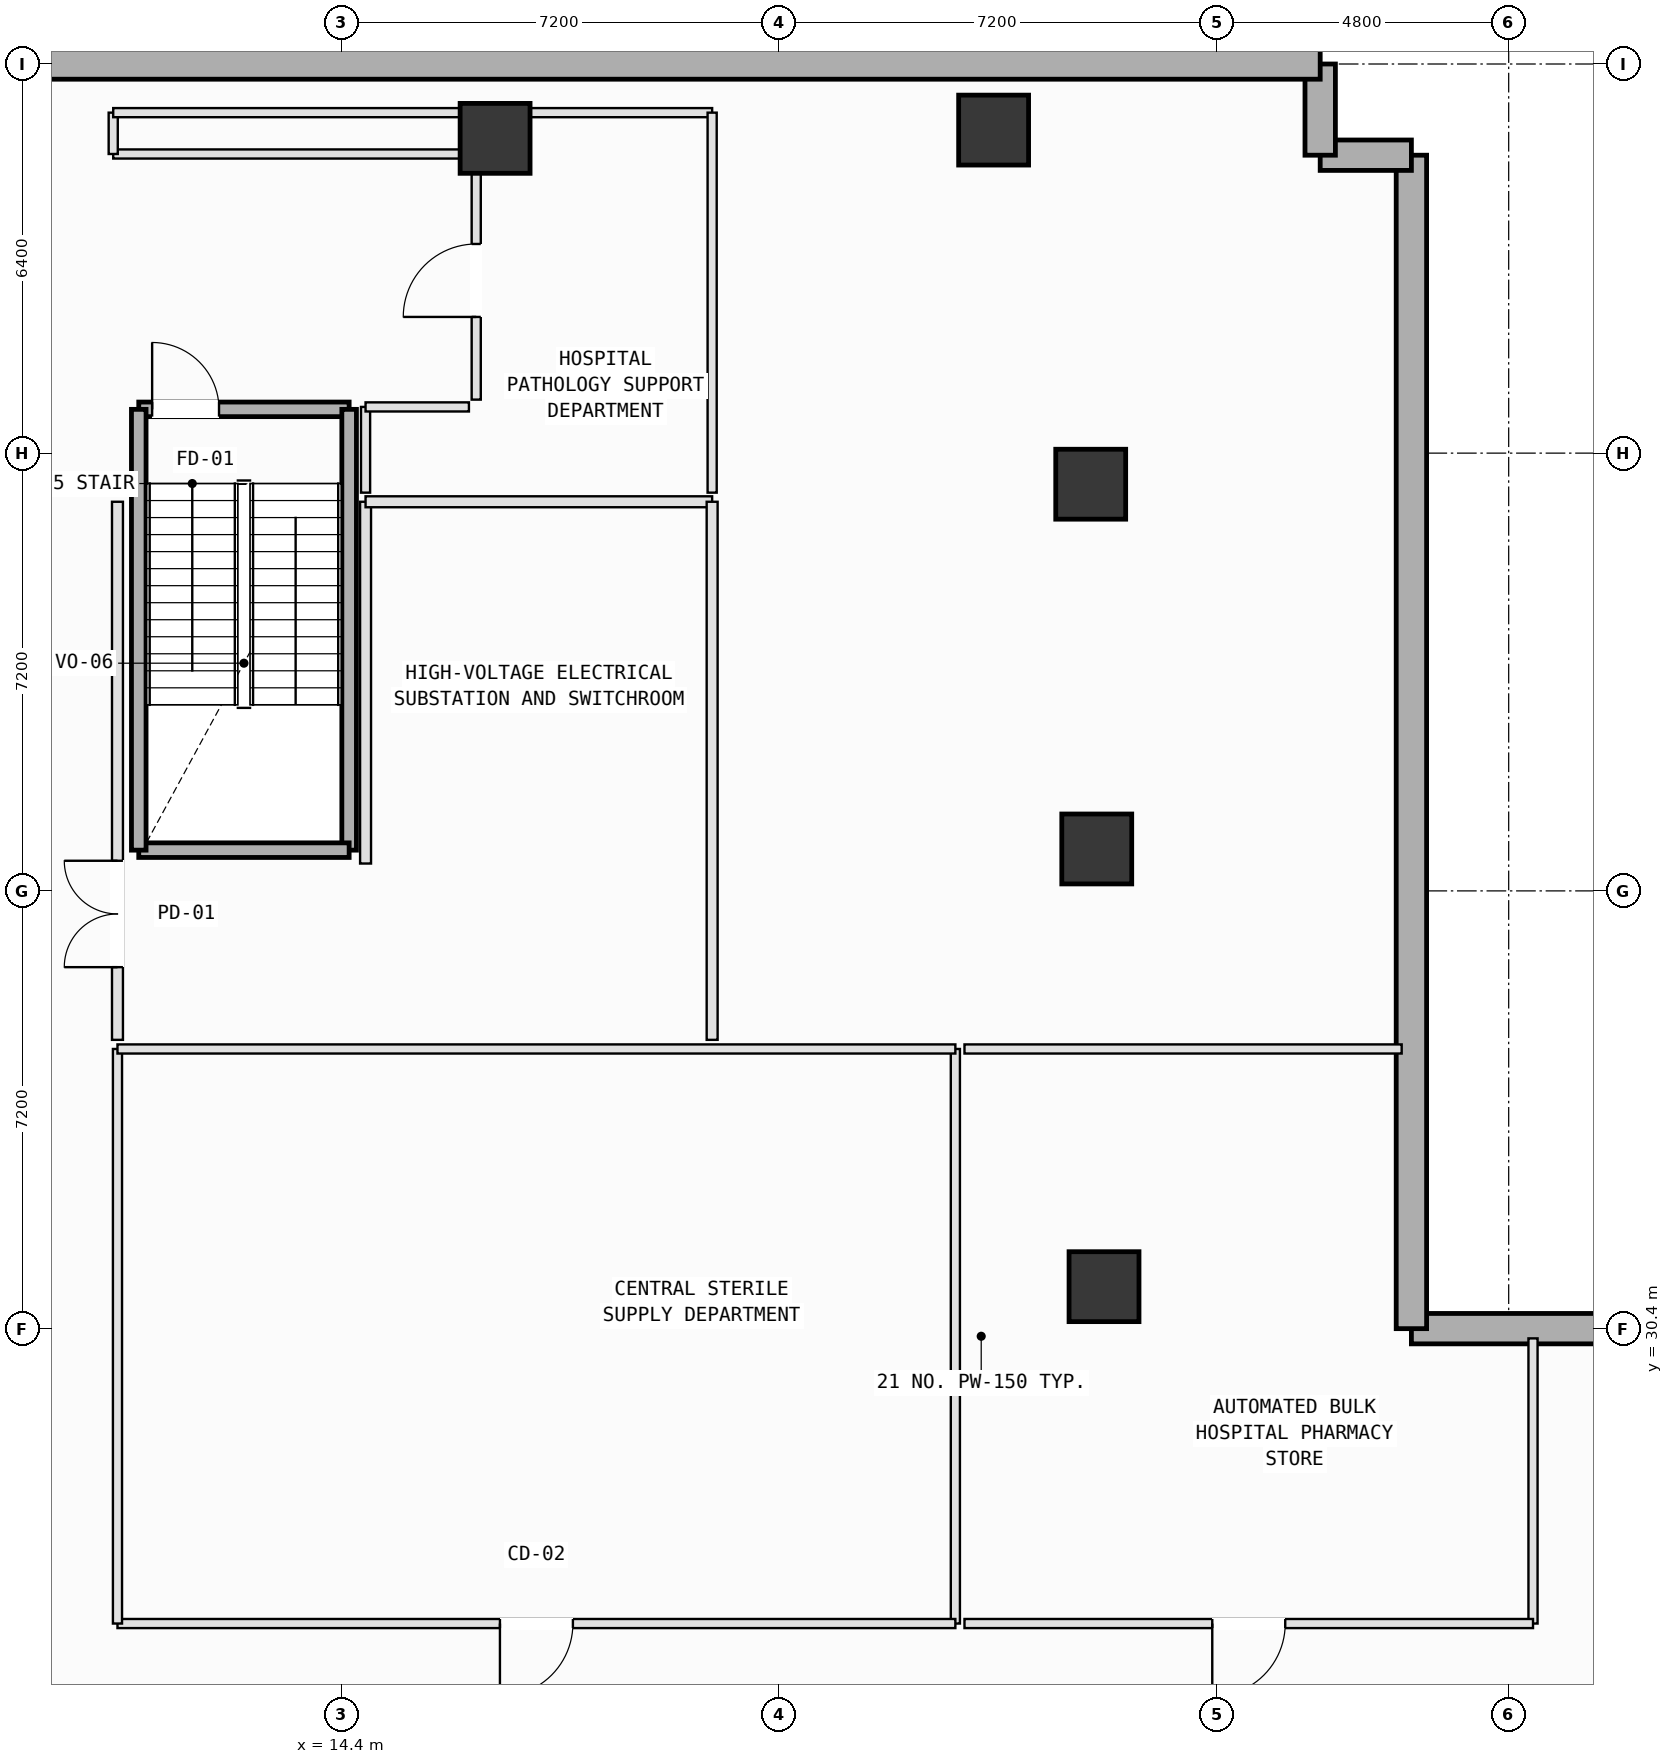
"""IFC4 building model, lengths in metres.
Left out: names, types, materials, properties, quantities, classifications, styles, units other than length and angle.
Written with IfcOpenShell. Run it as: python <this file> out.ifc"""

import sys

from ifc_helpers import new_model, si_unit, direction, frame, frame_2d, origin, origin_2d, place, context, subcontext, project, spatial, rectangle, extrude, element, fill, save


model = new_model("IFC4")
c1 = context("Model", 3, precision=1e-05, world=origin(), true_north=direction((0.0, 1.0)))
c2 = subcontext(c1, "Body", "Model", "MODEL_VIEW")
j1 = project(units=[si_unit("LENGTHUNIT", "METRE"), si_unit("PLANEANGLEUNIT", "RADIAN")], contexts=[c1])
p1 = place(None, origin())
s1 = spatial("IfcSite", under=j1, at=p1, CompositionType="ELEMENT")
p2 = place(p1, origin())
s2 = spatial("IfcBuilding", under=s1, at=p2, CompositionType="ELEMENT")
p3 = place(p2, frame((0.0, 0.0, -4.8)))
s3 = spatial("IfcBuildingStorey", under=s2, at=p3, CompositionType="ELEMENT", Elevation=-4.8)
for number, where, z_axis, x_axis in (
    (1, (26.945, 31.091, 0.0), (0.0, 0.0, 1.0), (1.0, 0.0, 0.0)),
    (2, (26.825, 38.29, 0.0), (0.0, 0.0, 1.0), (1.0, 0.0, 0.0)),
    (3, (26.726, 44.289, 0.0), (0.0, 0.0, 1.0), (1.0, 0.0, 0.0)),
    (4, (25.129, 50.113, 0.0), (0.0, 0.0, 1.0), (1.0, 0.0, 0.0)),
    (5, (16.93, 49.977, 0.0), (0.0, 0.0, 1.0), (1.0, 0.0, 0.0)),
):
    element("IfcColumn", number, at=place(p3, frame(where, z_axis=z_axis, x_axis=x_axis)), inside=s3, PredefinedType="COLUMN", context=c2, shape_type="SweptSolid", body=[
        extrude(rectangle(XDim=1.15, YDim=1.15, at=origin_2d()), origin(), (0.0, 0.0, 1.0), 4.8),
    ])
p4 = place(p3, frame((32.0, 30.4, 0.0), z_axis=(0.0, 0.0, 1.0), x_axis=(1.0, 0.0, 0.0)))
e6 = element("IfcWall", 6, at=p4, inside=s3, PredefinedType="USERDEFINED", context=c2, shape_type="SweptSolid", body=[
    extrude(rectangle(XDim=49.3, YDim=0.5, at=frame_2d((24.65, 0.0))), origin(), (0.0, 0.0, 1.0), 4.55),
])
p5 = place(p3, frame((32.0, 30.4, 0.0), z_axis=(0.0, 0.0, 1.0), x_axis=(0.0, 1.0, 0.0)))
e7 = element("IfcWall", 7, at=p5, inside=s3, PredefinedType="USERDEFINED", context=c2, shape_type="SweptSolid", body=[
    extrude(rectangle(XDim=19.3, YDim=0.5, at=frame_2d((9.65, 0.0))), origin(), (0.0, 0.0, 1.0), 4.55),
])
for number, where, z_axis, x_axis in (
    (8, (30.5, 49.7, 0.0), (0.0, 0.0, 1.0), (1.0, 0.0, 0.0)),
    (9, (30.5, 49.7, 0.0), (0.0, 0.0, 1.0), (0.0, 1.0, 0.0)),
):
    element("IfcWall", number, at=place(p3, frame(where, z_axis=z_axis, x_axis=x_axis)), inside=s3, PredefinedType="USERDEFINED", context=c2, shape_type="SweptSolid", body=[
        extrude(rectangle(XDim=1.5, YDim=0.5, at=frame_2d((0.75, 0.0))), origin(), (0.0, 0.0, 1.0), 4.55),
    ])
p6 = place(p3, frame((3.0, 51.2, 0.0), z_axis=(0.0, 0.0, 1.0), x_axis=(1.0, 0.0, 0.0)))
e10 = element("IfcWall", 10, at=p6, inside=s3, PredefinedType="USERDEFINED", context=c2, shape_type="SweptSolid", body=[
    extrude(rectangle(XDim=27.5, YDim=0.5, at=frame_2d((13.75, 0.0))), origin(), (0.0, 0.0, 1.0), 4.55),
])
p7 = place(p3, frame((11.07, 45.52, 0.0), z_axis=(0.0, 0.0, 1.0), x_axis=(1.0, 0.0, 0.0)))
e11 = element("IfcWall", 11, at=p7, inside=s3, PredefinedType="SOLIDWALL", context=c2, shape_type="SweptSolid", body=[
    extrude(rectangle(XDim=3.46, YDim=0.24, at=frame_2d((1.73, 0.0))), origin(), (0.0, 0.0, 1.0), 4.55),
])
p8 = place(p7, frame((0.22, 0.0, 0.0)))
e12 = element("IfcOpeningElement", 12, at=p8, cuts=e11, PredefinedType="OPENING", context=c2, shape_type="SweptSolid", body=[
    extrude(rectangle(XDim=1.1, YDim=2.15, at=frame_2d((0.55, 1.075))), frame((0.0, 0.13, 0.0), z_axis=(0.0, -1.0, 0.0), x_axis=(1.0, 0.0, 0.0)), (0.0, 0.0, 1.0), 0.26),
])
p9 = place(p3, frame((14.53, 45.52, 0.0), z_axis=(0.0, 0.0, 1.0), x_axis=(0.0, -1.0, 0.0)))
e13 = element("IfcWall", 13, at=p9, inside=s3, PredefinedType="SOLIDWALL", context=c2, shape_type="SweptSolid", body=[
    extrude(rectangle(XDim=7.25, YDim=0.24, at=frame_2d((3.625, 0.0))), origin(), (0.0, 0.0, 1.0), 4.55),
])
p10 = place(p3, frame((14.53, 38.27, 0.0), z_axis=(0.0, 0.0, 1.0), x_axis=(-1.0, 0.0, 0.0)))
e14 = element("IfcWall", 14, at=p10, inside=s3, PredefinedType="SOLIDWALL", context=c2, shape_type="SweptSolid", body=[
    extrude(rectangle(XDim=3.46, YDim=0.24, at=frame_2d((1.73, 0.0))), origin(), (0.0, 0.0, 1.0), 4.55),
])
p11 = place(p3, frame((11.07, 38.27, 0.0), z_axis=(0.0, 0.0, 1.0), x_axis=(0.0, 1.0, 0.0)))
e15 = element("IfcWall", 15, at=p11, inside=s3, PredefinedType="SOLIDWALL", context=c2, shape_type="SweptSolid", body=[
    extrude(rectangle(XDim=7.25, YDim=0.24, at=frame_2d((3.625, 0.0))), origin(), (0.0, 0.0, 1.0), 4.55),
])
p12 = place(p3, frame((24.5, 35.0, 0.0), z_axis=(0.0, 0.0, 1.0), x_axis=(0.0, -1.0, 0.0)))
e16 = element("IfcWall", 16, at=p12, inside=s3, PredefinedType="PARTITIONING", context=c2, shape_type="SweptSolid", body=[
    extrude(rectangle(XDim=9.45, YDim=0.15, at=frame_2d((4.725, 0.0))), origin(), (0.0, 0.0, 1.0), 4.55),
])
p13 = place(p3, frame((24.5, 25.55, 0.0), z_axis=(0.0, 0.0, 1.0), x_axis=(-1.0, 0.0, 0.0)))
e17 = element("IfcWall", 17, at=p13, inside=s3, PredefinedType="PARTITIONING", context=c2, shape_type="SweptSolid", body=[
    extrude(rectangle(XDim=13.78, YDim=0.15, at=frame_2d((6.89, 0.0))), origin(), (0.0, 0.0, 1.0), 4.55),
])
p14 = place(p13, frame((6.29, 0.0, 0.0)))
e18 = element("IfcOpeningElement", 18, at=p14, cuts=e17, PredefinedType="OPENING", context=c2, shape_type="SweptSolid", body=[
    extrude(rectangle(XDim=1.2, YDim=2.15, at=frame_2d((0.6, 1.075))), frame((0.0, 0.085, 0.0), z_axis=(0.0, -1.0, 0.0), x_axis=(1.0, 0.0, 0.0)), (0.0, 0.0, 1.0), 0.17),
])
p15 = place(p3, frame((10.72, 25.55, 0.0), z_axis=(0.0, 0.0, 1.0), x_axis=(0.0, 1.0, 0.0)))
e19 = element("IfcWall", 19, at=p15, inside=s3, PredefinedType="PARTITIONING", context=c2, shape_type="SweptSolid", body=[
    extrude(rectangle(XDim=9.45, YDim=0.15, at=frame_2d((4.725, 0.0))), origin(), (0.0, 0.0, 1.0), 4.55),
])
p16 = place(p3, frame((10.72, 35.0, 0.0), z_axis=(0.0, 0.0, 1.0), x_axis=(1.0, 0.0, 0.0)))
e20 = element("IfcWall", 20, at=p16, inside=s3, PredefinedType="PARTITIONING", context=c2, shape_type="SweptSolid", body=[
    extrude(rectangle(XDim=13.78, YDim=0.15, at=frame_2d((6.89, 0.0))), origin(), (0.0, 0.0, 1.0), 4.55),
])
p17 = place(p3, frame((34.0, 30.24, 0.0), z_axis=(0.0, 0.0, 1.0), x_axis=(0.0, -1.0, 0.0)))
e21 = element("IfcWall", 21, at=p17, inside=s3, PredefinedType="PARTITIONING", context=c2, shape_type="SweptSolid", body=[
    extrude(rectangle(XDim=4.69, YDim=0.15, at=frame_2d((2.345, 0.0))), origin(), (0.0, 0.0, 1.0), 4.55),
])
p18 = place(p3, frame((34.0, 25.55, 0.0), z_axis=(0.0, 0.0, 1.0), x_axis=(-1.0, 0.0, 0.0)))
e22 = element("IfcWall", 22, at=p18, inside=s3, PredefinedType="PARTITIONING", context=c2, shape_type="SweptSolid", body=[
    extrude(rectangle(XDim=9.35, YDim=0.15, at=frame_2d((4.675, 0.0))), origin(), (0.0, 0.0, 1.0), 4.55),
])
p19 = place(p18, frame((4.075, 0.0, 0.0)))
e23 = element("IfcOpeningElement", 23, at=p19, cuts=e22, PredefinedType="OPENING", context=c2, shape_type="SweptSolid", body=[
    extrude(rectangle(XDim=1.2, YDim=2.15, at=frame_2d((0.6, 1.075))), frame((0.0, 0.085, 0.0), z_axis=(0.0, -1.0, 0.0), x_axis=(1.0, 0.0, 0.0)), (0.0, 0.0, 1.0), 0.17),
])
p20 = place(p3, frame((24.65, 35.0, 0.0), z_axis=(0.0, 0.0, 1.0), x_axis=(1.0, 0.0, 0.0)))
e24 = element("IfcWall", 24, at=p20, inside=s3, PredefinedType="PARTITIONING", context=c2, shape_type="SweptSolid", body=[
    extrude(rectangle(XDim=7.19, YDim=0.15, at=frame_2d((3.595, 0.0))), origin(), (0.0, 0.0, 1.0), 4.55),
])
p21 = place(p3, frame((14.8, 38.05, 0.0), z_axis=(0.0, 0.0, 1.0), x_axis=(0.0, 1.0, 0.0)))
e25 = element("IfcWall", 25, at=p21, inside=s3, PredefinedType="PARTITIONING", context=c2, shape_type="SweptSolid", body=[
    extrude(rectangle(XDim=5.95, YDim=0.18, at=frame_2d((2.975, 0.0))), origin(), (0.0, 0.0, 1.0), 4.55),
])
p22 = place(p3, frame((14.8, 44.0, 0.0), z_axis=(0.0, 0.0, 1.0), x_axis=(1.0, 0.0, 0.0)))
e26 = element("IfcWall", 26, at=p22, inside=s3, PredefinedType="PARTITIONING", context=c2, shape_type="SweptSolid", body=[
    extrude(rectangle(XDim=5.7, YDim=0.18, at=frame_2d((2.85, 0.0))), origin(), (0.0, 0.0, 1.0), 4.55),
])
p23 = place(p3, frame((20.5, 44.0, 0.0), z_axis=(0.0, 0.0, 1.0), x_axis=(0.0, -1.0, 0.0)))
e27 = element("IfcWall", 27, at=p23, inside=s3, PredefinedType="PARTITIONING", context=c2, shape_type="SweptSolid", body=[
    extrude(rectangle(XDim=8.85, YDim=0.18, at=frame_2d((4.425, 0.0))), origin(), (0.0, 0.0, 1.0), 4.55),
])
p24 = place(p3, frame((10.72, 35.15, 0.0), z_axis=(0.0, 0.0, 1.0), x_axis=(0.0, 1.0, 0.0)))
e28 = element("IfcWall", 28, at=p24, inside=s3, PredefinedType="PARTITIONING", context=c2, shape_type="SweptSolid", body=[
    extrude(rectangle(XDim=8.85, YDim=0.18, at=frame_2d((4.425, 0.0))), origin(), (0.0, 0.0, 1.0), 4.55),
])
p25 = place(p24, frame((1.196, 0.0, 0.0)))
e29 = element("IfcOpeningElement", 29, at=p25, cuts=e28, PredefinedType="OPENING", context=c2, shape_type="SweptSolid", body=[
    extrude(rectangle(XDim=1.75, YDim=2.2, at=frame_2d((0.875, 1.1))), frame((0.0, 0.1, 0.0), z_axis=(0.0, -1.0, 0.0), x_axis=(1.0, 0.0, 0.0)), (0.0, 0.0, 1.0), 0.2),
])
p26 = place(p3, frame((16.62, 45.68, 0.0), z_axis=(0.0, 0.0, 1.0), x_axis=(0.0, 1.0, 0.0)))
e30 = element("IfcWall", 30, at=p26, inside=s3, PredefinedType="PARTITIONING", context=c2, shape_type="SweptSolid", body=[
    extrude(rectangle(XDim=3.92, YDim=0.15, at=frame_2d((1.96, 0.0))), origin(), (0.0, 0.0, 1.0), 4.55),
])
p27 = place(p26, frame((1.36, 0.0, 0.0)))
e31 = element("IfcOpeningElement", 31, at=p27, cuts=e30, PredefinedType="OPENING", context=c2, shape_type="SweptSolid", body=[
    extrude(rectangle(XDim=1.2, YDim=2.15, at=frame_2d((0.6, 1.075))), frame((0.0, 0.085, 0.0), z_axis=(0.0, -1.0, 0.0), x_axis=(1.0, 0.0, 0.0)), (0.0, 0.0, 1.0), 0.17),
])
p28 = place(p3, frame((16.5, 49.72, 0.0), z_axis=(0.0, 0.0, 1.0), x_axis=(-1.0, 0.0, 0.0)))
e32 = element("IfcWall", 32, at=p28, inside=s3, PredefinedType="PARTITIONING", context=c2, shape_type="SweptSolid", body=[
    extrude(rectangle(XDim=5.85, YDim=0.15, at=frame_2d((2.925, 0.0))), origin(), (0.0, 0.0, 1.0), 3.735),
])
p29 = place(p3, frame((10.65, 49.72, 0.0), z_axis=(0.0, 0.0, 1.0), x_axis=(0.0, 1.0, 0.0)))
e33 = element("IfcWall", 33, at=p29, inside=s3, PredefinedType="PARTITIONING", context=c2, shape_type="SweptSolid", body=[
    extrude(rectangle(XDim=0.68, YDim=0.15, at=frame_2d((0.34, 0.0))), origin(), (0.0, 0.0, 1.0), 4.55),
])
p30 = place(p3, frame((10.65, 50.4, 0.0), z_axis=(0.0, 0.0, 1.0), x_axis=(1.0, 0.0, 0.0)))
e34 = element("IfcWall", 34, at=p30, inside=s3, PredefinedType="PARTITIONING", context=c2, shape_type="SweptSolid", body=[
    extrude(rectangle(XDim=9.85, YDim=0.15, at=frame_2d((4.925, 0.0))), origin(), (0.0, 0.0, 1.0), 3.735),
])
p31 = place(p3, frame((20.5, 50.4, 0.0), z_axis=(0.0, 0.0, 1.0), x_axis=(0.0, -1.0, 0.0)))
e35 = element("IfcWall", 35, at=p31, inside=s3, PredefinedType="PARTITIONING", context=c2, shape_type="SweptSolid", body=[
    extrude(rectangle(XDim=6.25, YDim=0.15, at=frame_2d((3.125, 0.0))), origin(), (0.0, 0.0, 1.0), 4.55),
])
p32 = place(p3, frame((14.8, 44.15, 0.0), z_axis=(0.0, 0.0, 1.0), x_axis=(0.0, 1.0, 0.0)))
e36 = element("IfcWall", 36, at=p32, inside=s3, PredefinedType="PARTITIONING", context=c2, shape_type="SweptSolid", body=[
    extrude(rectangle(XDim=1.41, YDim=0.15, at=frame_2d((0.705, 0.0))), origin(), (0.0, 0.0, 1.0), 4.55),
])
p33 = place(p3, frame((14.8, 45.56, 0.0), z_axis=(0.0, 0.0, 1.0), x_axis=(1.0, 0.0, 0.0)))
e37 = element("IfcWall", 37, at=p33, inside=s3, PredefinedType="PARTITIONING", context=c2, shape_type="SweptSolid", body=[
    extrude(rectangle(XDim=1.7, YDim=0.15, at=frame_2d((0.85, 0.0))), origin(), (0.0, 0.0, 1.0), 4.55),
])
p34 = place(p8, origin())
e38 = element("IfcDoor", 38, at=p34, inside=s3, OperationType="SINGLE_SWING_LEFT", PredefinedType="DOOR", context=c2, shape_type="SweptSolid", body=[
    extrude(rectangle(XDim=1.1, YDim=2.15, at=frame_2d((0.55, 1.075))), frame((0.0, 0.025, 0.0), z_axis=(0.0, -1.0, 0.0), x_axis=(1.0, 0.0, 0.0)), (0.0, 0.0, 1.0), 0.05),
])
fill(e12, e38)
p35 = place(p14, origin())
e39 = element("IfcDoor", 39, at=p35, inside=s3, OperationType="SINGLE_SWING_RIGHT", PredefinedType="DOOR", context=c2, shape_type="SweptSolid", body=[
    extrude(rectangle(XDim=1.2, YDim=2.15, at=frame_2d((0.6, 1.075))), frame((0.0, 0.025, 0.0), z_axis=(0.0, -1.0, 0.0), x_axis=(1.0, 0.0, 0.0)), (0.0, 0.0, 1.0), 0.05),
])
fill(e18, e39)
p36 = place(p19, origin())
e40 = element("IfcDoor", 40, at=p36, inside=s3, OperationType="SINGLE_SWING_RIGHT", PredefinedType="DOOR", context=c2, shape_type="SweptSolid", body=[
    extrude(rectangle(XDim=1.2, YDim=2.15, at=frame_2d((0.6, 1.075))), frame((0.0, 0.025, 0.0), z_axis=(0.0, -1.0, 0.0), x_axis=(1.0, 0.0, 0.0)), (0.0, 0.0, 1.0), 0.05),
])
fill(e23, e40)
p37 = place(p25, origin())
e41 = element("IfcDoor", 41, at=p37, inside=s3, OperationType="DOUBLE_DOOR_SINGLE_SWING", PredefinedType="DOOR", context=c2, shape_type="SweptSolid", body=[
    extrude(rectangle(XDim=1.75, YDim=2.2, at=frame_2d((0.875, 1.1))), frame((0.0, 0.025, 0.0), z_axis=(0.0, -1.0, 0.0), x_axis=(1.0, 0.0, 0.0)), (0.0, 0.0, 1.0), 0.05),
])
fill(e29, e41)
p38 = place(p27, origin())
e42 = element("IfcDoor", 42, at=p38, inside=s3, OperationType="SINGLE_SWING_LEFT", PredefinedType="DOOR", context=c2, shape_type="SweptSolid", body=[
    extrude(rectangle(XDim=1.2, YDim=2.15, at=frame_2d((0.6, 1.075))), frame((0.0, 0.025, 0.0), z_axis=(0.0, -1.0, 0.0), x_axis=(1.0, 0.0, 0.0)), (0.0, 0.0, 1.0), 0.05),
])
fill(e31, e42)
save(model, sys.argv[1])
